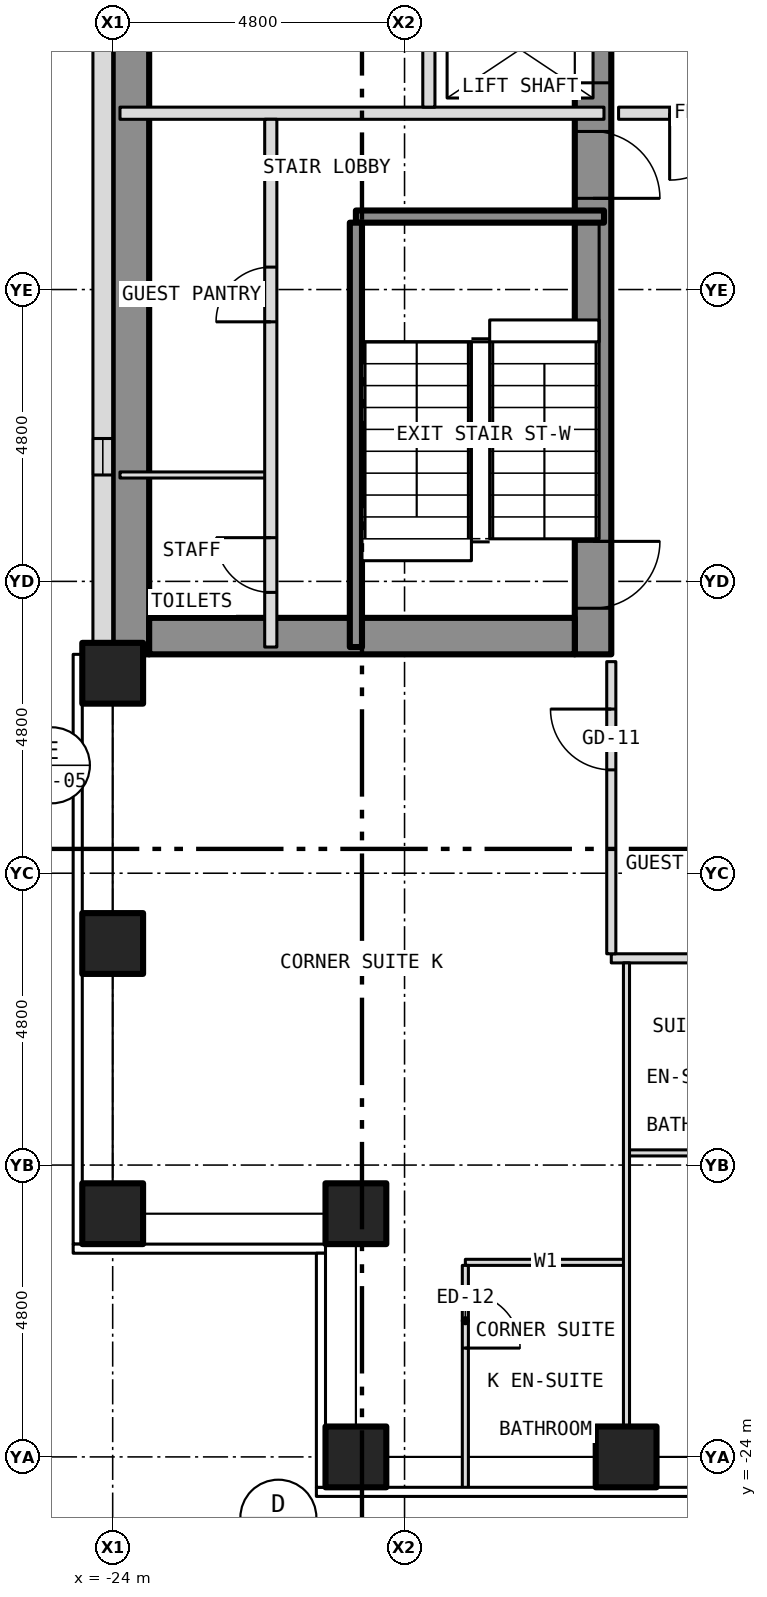
"""IFC4 building model, lengths in metres.
Left out: names, types, materials, properties, quantities, classifications, styles, units other than length and angle.
Written with IfcOpenShell. Run it as: python <this file> out.ifc"""

import sys

from ifc_helpers import new_model, si_unit, direction, frame, frame_2d, origin, origin_2d, place, context, subcontext, project, spatial, rectangle, hollow_rectangle, extrude, element, fill, save


model = new_model("IFC4")
c1 = context("Model", 3, precision=1e-05, world=origin(), true_north=direction((0.0, 1.0)))
c2 = subcontext(c1, "Body", "Model", "MODEL_VIEW")
j1 = project(units=[si_unit("LENGTHUNIT", "METRE"), si_unit("PLANEANGLEUNIT", "RADIAN")], contexts=[c1])
p1 = place(None, origin())
s1 = spatial("IfcSite", under=j1, at=p1, CompositionType="ELEMENT")
p2 = place(p1, origin())
s2 = spatial("IfcBuilding", under=s1, at=p2, CompositionType="ELEMENT")
p3 = place(p2, frame((0.0, 0.0, 46.0)))
s3 = spatial("IfcBuildingStorey", under=s2, at=p3, CompositionType="ELEMENT", Elevation=46.0)
for number, where, z_axis, x_axis in (
    (1, (-20.0, -24.0, -0.15), (0.0, 0.0, 1.0), (1.0, 0.0, 0.0)),
    (2, (-15.556, -24.0, -0.15), (0.0, 0.0, 1.0), (1.0, 0.0, 0.0)),
    (3, (-24.0, -20.0, -0.15), (0.0, 0.0, 1.0), (1.0, 0.0, 0.0)),
    (4, (-24.0, -15.556, -0.15), (0.0, 0.0, 1.0), (1.0, 0.0, 0.0)),
    (5, (-24.0, -11.111, -0.15), (0.0, 0.0, 1.0), (1.0, 0.0, 0.0)),
    (6, (-20.0, -20.0, -0.15), (0.0, 0.0, 1.0), (1.0, 0.0, 0.0)),
):
    element("IfcColumn", number, at=place(p3, frame(where, z_axis=z_axis, x_axis=x_axis)), inside=s3, PredefinedType="COLUMN", context=c2, shape_type="SweptSolid", body=[
        extrude(hollow_rectangle(XDim=1.0, YDim=1.0, WallThickness=0.06, at=origin_2d()), origin(), (0.0, 0.0, 1.0), 3.5),
    ])
p4 = place(p3, frame((-16.1, -10.8, 0.0), z_axis=(0.0, 0.0, 1.0), x_axis=(0.0, 1.0, 0.0)))
e7 = element("IfcWall", 7, at=p4, inside=s3, PredefinedType="SHEAR", context=c2, shape_type="SweptSolid", body=[
    extrude(rectangle(XDim=21.6, YDim=0.6, at=frame_2d((10.8, 0.0))), origin(), (0.0, 0.0, 1.0), 3.25),
])
p5 = place(p4, frame((9.4, 0.0, 0.0)))
e8 = element("IfcOpeningElement", 8, at=p5, cuts=e7, PredefinedType="OPENING", context=c2, shape_type="SweptSolid", body=[
    extrude(rectangle(XDim=1.1, YDim=2.1, at=frame_2d((0.55, 1.05))), frame((0.0, 0.312, 0.0), z_axis=(0.0, -1.0, 0.0), x_axis=(1.0, 0.0, 0.0)), (0.0, 0.0, 1.0), 0.624),
])
p6 = place(p4, frame((11.5, 0.0, 0.0)))
e9 = element("IfcOpeningElement", 9, at=p6, cuts=e7, PredefinedType="OPENING", context=c2, shape_type="SweptSolid", body=[
    extrude(rectangle(XDim=1.1, YDim=2.1, at=frame_2d((0.55, 1.05))), frame((0.0, 0.312, 0.0), z_axis=(0.0, -1.0, 0.0), x_axis=(1.0, 0.0, 0.0)), (0.0, 0.0, 1.0), 0.624),
])
p7 = place(p4, frame((13.6, 0.0, 0.0)))
e10 = element("IfcOpeningElement", 10, at=p7, cuts=e7, PredefinedType="OPENING", context=c2, shape_type="SweptSolid", body=[
    extrude(rectangle(XDim=1.1, YDim=2.1, at=frame_2d((0.55, 1.05))), frame((0.0, 0.312, 0.0), z_axis=(0.0, -1.0, 0.0), x_axis=(1.0, 0.0, 0.0)), (0.0, 0.0, 1.0), 0.624),
])
p8 = place(p4, frame((15.7, 0.0, 0.0)))
e11 = element("IfcOpeningElement", 11, at=p8, cuts=e7, PredefinedType="OPENING", context=c2, shape_type="SweptSolid", body=[
    extrude(rectangle(XDim=1.1, YDim=2.1, at=frame_2d((0.55, 1.05))), frame((0.0, 0.312, 0.0), z_axis=(0.0, -1.0, 0.0), x_axis=(1.0, 0.0, 0.0)), (0.0, 0.0, 1.0), 0.624),
])
p9 = place(p4, frame((17.8, 0.0, 0.0)))
e12 = element("IfcOpeningElement", 12, at=p9, cuts=e7, PredefinedType="OPENING", context=c2, shape_type="SweptSolid", body=[
    extrude(rectangle(XDim=1.1, YDim=2.1, at=frame_2d((0.55, 1.05))), frame((0.0, 0.312, 0.0), z_axis=(0.0, -1.0, 0.0), x_axis=(1.0, 0.0, 0.0)), (0.0, 0.0, 1.0), 0.624),
])
p10 = place(p4, frame((0.758, 0.0, 0.0)))
e13 = element("IfcOpeningElement", 13, at=p10, cuts=e7, PredefinedType="OPENING", context=c2, shape_type="SweptSolid", body=[
    extrude(rectangle(XDim=1.1, YDim=2.1, at=frame_2d((0.55, 1.05))), frame((0.0, 0.312, 0.0), z_axis=(0.0, -1.0, 0.0), x_axis=(1.0, 0.0, 0.0)), (0.0, 0.0, 1.0), 0.624),
])
p11 = place(p4, frame((7.5, 0.0, 0.0)))
e14 = element("IfcOpeningElement", 14, at=p11, cuts=e7, PredefinedType="OPENING", context=c2, shape_type="SweptSolid", body=[
    extrude(rectangle(XDim=1.1, YDim=2.1, at=frame_2d((0.55, 1.05))), frame((0.0, 0.312, 0.0), z_axis=(0.0, -1.0, 0.0), x_axis=(1.0, 0.0, 0.0)), (0.0, 0.0, 1.0), 0.624),
])
p12 = place(p3, frame((-23.7, -10.8, 0.0), z_axis=(0.0, 0.0, 1.0), x_axis=(0.0, 1.0, 0.0)))
e15 = element("IfcWall", 15, at=p12, inside=s3, PredefinedType="SHEAR", context=c2, shape_type="SweptSolid", body=[
    extrude(rectangle(XDim=21.6, YDim=0.6, at=frame_2d((10.8, 0.0))), origin(), (0.0, 0.0, 1.0), 3.25),
])
p13 = place(p3, frame((-23.4, -10.5, 0.0), z_axis=(0.0, 0.0, 1.0), x_axis=(1.0, 0.0, 0.0)))
e16 = element("IfcWall", 16, at=p13, inside=s3, PredefinedType="SHEAR", context=c2, shape_type="SweptSolid", body=[
    extrude(rectangle(XDim=7.0, YDim=0.6, at=frame_2d((3.5, 0.0))), origin(), (0.0, 0.0, 1.0), 3.25),
])
p14 = place(p3, frame((-24.163, 10.8, 0.0), z_axis=(0.0, 0.0, 1.0), x_axis=(0.0, -1.0, 0.0)))
e17 = element("IfcWall", 17, at=p14, inside=s3, PredefinedType="SOLIDWALL", context=c2, shape_type="SweptSolid", body=[
    extrude(rectangle(XDim=21.6, YDim=0.325, at=frame_2d((10.8, 0.0))), origin(), (0.0, 0.0, 1.0), 3.5),
])
p15 = place(p14, frame((18.05, 0.0, 1.0)))
e18 = element("IfcOpeningElement", 18, at=p15, cuts=e17, PredefinedType="OPENING", context=c2, shape_type="SweptSolid", body=[
    extrude(rectangle(XDim=0.6, YDim=1.5, at=frame_2d((0.3, 0.75))), frame((0.0, 0.175, 0.0), z_axis=(0.0, -1.0, 0.0), x_axis=(1.0, 0.0, 0.0)), (0.0, 0.0, 1.0), 0.349),
])
p16 = place(p3, frame((-18.2, -20.8, 0.0), z_axis=(0.0, 0.0, 1.0), x_axis=(1.0, 0.0, 0.0)))
e19 = element("IfcWall", 19, at=p16, inside=s3, PredefinedType="PARTITIONING", context=c2, shape_type="SweptSolid", body=[
    extrude(rectangle(XDim=2.65, YDim=0.1, at=frame_2d((1.325, 0.0))), origin(), (0.0, 0.0, 1.0), 3.35),
])
p17 = place(p3, frame((-15.55, -19.0, 0.0), z_axis=(0.0, 0.0, 1.0), x_axis=(1.0, 0.0, 0.0)))
e20 = element("IfcWall", 20, at=p17, inside=s3, PredefinedType="PARTITIONING", context=c2, shape_type="SweptSolid", body=[
    extrude(rectangle(XDim=2.2, YDim=0.1, at=frame_2d((1.1, 0.0))), origin(), (0.0, 0.0, 1.0), 3.35),
])
p18 = place(p3, frame((-15.8, -15.8, 0.0), z_axis=(0.0, 0.0, 1.0), x_axis=(1.0, 0.0, 0.0)))
e21 = element("IfcWall", 21, at=p18, inside=s3, PredefinedType="PARTITIONING", context=c2, shape_type="SweptSolid", body=[
    extrude(rectangle(XDim=31.6, YDim=0.15, at=frame_2d((15.8, 0.0))), origin(), (0.0, 0.0, 1.0), 3.35),
])
p19 = place(p18, frame((6.633, 0.0, 0.0)))
e22 = element("IfcOpeningElement", 22, at=p19, cuts=e21, PredefinedType="OPENING", context=c2, shape_type="SweptSolid", body=[
    extrude(rectangle(XDim=1.0, YDim=2.1, at=frame_2d((0.5, 1.05))), frame((0.0, 0.087, 0.0), z_axis=(0.0, -1.0, 0.0), x_axis=(1.0, 0.0, 0.0)), (0.0, 0.0, 1.0), 0.174),
])
p20 = place(p18, frame((11.956, 0.0, 0.0)))
e23 = element("IfcOpeningElement", 23, at=p20, cuts=e21, PredefinedType="OPENING", context=c2, shape_type="SweptSolid", body=[
    extrude(rectangle(XDim=1.0, YDim=2.1, at=frame_2d((0.5, 1.05))), frame((0.0, 0.087, 0.0), z_axis=(0.0, -1.0, 0.0), x_axis=(1.0, 0.0, 0.0)), (0.0, 0.0, 1.0), 0.174),
])
p21 = place(p18, frame((16.4, 0.0, 0.0)))
e24 = element("IfcOpeningElement", 24, at=p21, cuts=e21, PredefinedType="OPENING", context=c2, shape_type="SweptSolid", body=[
    extrude(rectangle(XDim=1.0, YDim=2.1, at=frame_2d((0.5, 1.05))), frame((0.0, 0.087, 0.0), z_axis=(0.0, -1.0, 0.0), x_axis=(1.0, 0.0, 0.0)), (0.0, 0.0, 1.0), 0.174),
])
p22 = place(p18, frame((21.956, 0.0, 0.0)))
e25 = element("IfcOpeningElement", 25, at=p22, cuts=e21, PredefinedType="OPENING", context=c2, shape_type="SweptSolid", body=[
    extrude(rectangle(XDim=1.0, YDim=2.1, at=frame_2d((0.5, 1.05))), frame((0.0, 0.087, 0.0), z_axis=(0.0, -1.0, 0.0), x_axis=(1.0, 0.0, 0.0)), (0.0, 0.0, 1.0), 0.174),
])
p23 = place(p18, frame((28.623, 0.0, 0.0)))
e26 = element("IfcOpeningElement", 26, at=p23, cuts=e21, PredefinedType="OPENING", context=c2, shape_type="SweptSolid", body=[
    extrude(rectangle(XDim=1.0, YDim=2.1, at=frame_2d((0.5, 1.05))), frame((0.0, 0.087, 0.0), z_axis=(0.0, -1.0, 0.0), x_axis=(1.0, 0.0, 0.0)), (0.0, 0.0, 1.0), 0.174),
])
p24 = place(p3, frame((-23.88, -7.85, 0.0), z_axis=(0.0, 0.0, 1.0), x_axis=(1.0, 0.0, 0.0)))
e27 = element("IfcWall", 27, at=p24, inside=s3, PredefinedType="PARTITIONING", context=c2, shape_type="SweptSolid", body=[
    extrude(rectangle(XDim=2.48, YDim=0.1, at=frame_2d((1.24, 0.0))), origin(), (0.0, 0.0, 1.0), 3.25),
])
p25 = place(p3, frame((-20.0, -3.6, 0.0), z_axis=(0.0, 0.0, 1.0), x_axis=(1.0, 0.0, 0.0)))
e28 = element("IfcWall", 28, at=p25, inside=s3, PredefinedType="SHEAR", context=c2, shape_type="SweptSolid", body=[
    extrude(rectangle(XDim=4.08, YDim=0.2, at=frame_2d((2.04, 0.0))), origin(), (0.0, 0.0, 1.0), 3.25),
])
p26 = place(p3, frame((-23.88, -1.9, 0.0), z_axis=(0.0, 0.0, 1.0), x_axis=(1.0, 0.0, 0.0)))
e29 = element("IfcWall", 29, at=p26, inside=s3, PredefinedType="PARTITIONING", context=c2, shape_type="SweptSolid", body=[
    extrude(rectangle(XDim=7.96, YDim=0.2, at=frame_2d((3.98, 0.0))), origin(), (0.0, 0.0, 1.0), 3.25),
])
p27 = place(p3, frame((-15.68, -1.9, 0.0), z_axis=(0.0, 0.0, 1.0), x_axis=(1.0, 0.0, 0.0)))
e30 = element("IfcWall", 30, at=p27, inside=s3, PredefinedType="PARTITIONING", context=c2, shape_type="SweptSolid", body=[
    extrude(rectangle(XDim=3.28, YDim=0.2, at=frame_2d((1.64, 0.0))), origin(), (0.0, 0.0, 1.0), 3.35),
])
p28 = place(p27, frame((0.84, 0.0, 0.0)))
e31 = element("IfcOpeningElement", 31, at=p28, cuts=e30, PredefinedType="OPENING", context=c2, shape_type="SweptSolid", body=[
    extrude(rectangle(XDim=1.1, YDim=2.1, at=frame_2d((0.55, 1.05))), frame((0.0, 0.112, 0.0), z_axis=(0.0, -1.0, 0.0), x_axis=(1.0, 0.0, 0.0)), (0.0, 0.0, 1.0), 0.224),
])
p29 = place(p3, frame((-21.4, -10.68, 0.0), z_axis=(0.0, 0.0, 1.0), x_axis=(0.0, 1.0, 0.0)))
e32 = element("IfcWall", 32, at=p29, inside=s3, PredefinedType="PARTITIONING", context=c2, shape_type="SweptSolid", body=[
    extrude(rectangle(XDim=8.68, YDim=0.2, at=frame_2d((4.34, 0.0))), origin(), (0.0, 0.0, 1.0), 3.25),
])
p30 = place(p29, frame((0.899, 0.0, 0.0)))
e33 = element("IfcOpeningElement", 33, at=p30, cuts=e32, PredefinedType="OPENING", context=c2, shape_type="SweptSolid", body=[
    extrude(rectangle(XDim=0.9, YDim=2.1, at=frame_2d((0.45, 1.05))), frame((0.0, 0.112, 0.0), z_axis=(0.0, -1.0, 0.0), x_axis=(1.0, 0.0, 0.0)), (0.0, 0.0, 1.0), 0.224),
])
p31 = place(p29, frame((5.349, 0.0, 0.0)))
e34 = element("IfcOpeningElement", 34, at=p31, cuts=e32, PredefinedType="OPENING", context=c2, shape_type="SweptSolid", body=[
    extrude(rectangle(XDim=0.9, YDim=2.1, at=frame_2d((0.45, 1.05))), frame((0.0, 0.112, 0.0), z_axis=(0.0, -1.0, 0.0), x_axis=(1.0, 0.0, 0.0)), (0.0, 0.0, 1.0), 0.224),
])
p32 = place(p3, frame((-20.0, -10.68, 0.0), z_axis=(0.0, 0.0, 1.0), x_axis=(0.0, 1.0, 0.0)))
e35 = element("IfcWall", 35, at=p32, inside=s3, PredefinedType="SHEAR", context=c2, shape_type="SweptSolid", body=[
    extrude(rectangle(XDim=6.98, YDim=0.2, at=frame_2d((3.49, 0.0))), origin(), (0.0, 0.0, 1.0), 3.25),
])
p33 = place(p3, frame((-18.8, -1.8, 0.0), z_axis=(0.0, 0.0, 1.0), x_axis=(0.0, 1.0, 0.0)))
e36 = element("IfcWall", 36, at=p33, inside=s3, PredefinedType="PARTITIONING", context=c2, shape_type="SweptSolid", body=[
    extrude(rectangle(XDim=12.48, YDim=0.2, at=frame_2d((6.24, 0.0))), origin(), (0.0, 0.0, 1.0), 3.25),
])
p34 = place(p3, frame((-18.2, -24.53, 0.0), z_axis=(0.0, 0.0, 1.0), x_axis=(0.0, 1.0, 0.0)))
e37 = element("IfcWall", 37, at=p34, inside=s3, PredefinedType="PARTITIONING", context=c2, shape_type="SweptSolid", body=[
    extrude(rectangle(XDim=3.68, YDim=0.1, at=frame_2d((1.84, 0.0))), origin(), (0.0, 0.0, 1.0), 3.35),
])
p35 = place(p34, frame((2.32, 0.0, 0.0)))
e38 = element("IfcOpeningElement", 38, at=p35, cuts=e37, PredefinedType="OPENING", context=c2, shape_type="SweptSolid", body=[
    extrude(rectangle(XDim=0.9, YDim=2.1, at=frame_2d((0.45, 1.05))), frame((0.0, 0.062, 0.0), z_axis=(0.0, -1.0, 0.0), x_axis=(1.0, 0.0, 0.0)), (0.0, 0.0, 1.0), 0.124),
])
p36 = place(p3, frame((-15.8, -15.725, 0.0), z_axis=(0.0, 0.0, 1.0), x_axis=(0.0, 1.0, 0.0)))
e39 = element("IfcWall", 39, at=p36, inside=s3, PredefinedType="PARTITIONING", context=c2, shape_type="SweptSolid", body=[
    extrude(rectangle(XDim=4.805, YDim=0.15, at=frame_2d((2.403, 0.0))), origin(), (0.0, 0.0, 1.0), 3.35),
])
p37 = place(p36, frame((3.025, 0.0, 0.0)))
e40 = element("IfcOpeningElement", 40, at=p37, cuts=e39, PredefinedType="OPENING", context=c2, shape_type="SweptSolid", body=[
    extrude(rectangle(XDim=1.0, YDim=2.1, at=frame_2d((0.5, 1.05))), frame((0.0, 0.087, 0.0), z_axis=(0.0, -1.0, 0.0), x_axis=(1.0, 0.0, 0.0)), (0.0, 0.0, 1.0), 0.174),
])
p38 = place(p3, frame((-15.55, -23.88, 0.0), z_axis=(0.0, 0.0, 1.0), x_axis=(0.0, 1.0, 0.0)))
e41 = element("IfcWall", 41, at=p38, inside=s3, PredefinedType="PARTITIONING", context=c2, shape_type="SweptSolid", body=[
    extrude(rectangle(XDim=8.005, YDim=0.1, at=frame_2d((4.002, 0.0))), origin(), (0.0, 0.0, 1.0), 3.35),
])
p39 = place(p15, origin())
e42 = element("IfcWindow", 42, at=p39, inside=s3, PartitioningType="SINGLE_PANEL", PredefinedType="WINDOW", context=c2, shape_type="SweptSolid", body=[
    extrude(rectangle(XDim=0.6, YDim=1.5, at=frame_2d((0.3, 0.75))), frame((0.0, -0.073, 0.0), z_axis=(0.0, -1.0, 0.0), x_axis=(1.0, 0.0, 0.0)), (0.0, 0.0, 1.0), 0.06),
])
fill(e18, e42)
p40 = place(p5, origin())
e43 = element("IfcDoor", 43, at=p40, inside=s3, OperationType="SLIDING_TO_LEFT", PredefinedType="DOOR", context=c2, shape_type="SweptSolid", body=[
    extrude(rectangle(XDim=1.1, YDim=2.1, at=frame_2d((0.55, 1.05))), frame((0.0, 0.025, 0.0), z_axis=(0.0, -1.0, 0.0), x_axis=(1.0, 0.0, 0.0)), (0.0, 0.0, 1.0), 0.05),
])
fill(e8, e43)
p41 = place(p10, origin())
e44 = element("IfcDoor", 44, at=p41, inside=s3, OperationType="SINGLE_SWING_RIGHT", PredefinedType="DOOR", context=c2, shape_type="SweptSolid", body=[
    extrude(rectangle(XDim=1.1, YDim=2.1, at=frame_2d((0.55, 1.05))), frame((0.0, 0.025, 0.0), z_axis=(0.0, -1.0, 0.0), x_axis=(1.0, 0.0, 0.0)), (0.0, 0.0, 1.0), 0.05),
])
fill(e13, e44)
p42 = place(p11, origin())
e45 = element("IfcDoor", 45, at=p42, inside=s3, OperationType="SINGLE_SWING_LEFT", PredefinedType="DOOR", context=c2, shape_type="SweptSolid", body=[
    extrude(rectangle(XDim=1.1, YDim=2.1, at=frame_2d((0.55, 1.05))), frame((0.0, 0.025, 0.0), z_axis=(0.0, -1.0, 0.0), x_axis=(1.0, 0.0, 0.0)), (0.0, 0.0, 1.0), 0.05),
])
fill(e14, e45)
p43 = place(p30, origin())
e46 = element("IfcDoor", 46, at=p43, inside=s3, OperationType="SINGLE_SWING_RIGHT", PredefinedType="DOOR", context=c2, shape_type="SweptSolid", body=[
    extrude(rectangle(XDim=0.9, YDim=2.1, at=frame_2d((0.45, 1.05))), frame((0.0, 0.025, 0.0), z_axis=(0.0, -1.0, 0.0), x_axis=(1.0, 0.0, 0.0)), (0.0, 0.0, 1.0), 0.05),
])
fill(e33, e46)
p44 = place(p31, origin())
e47 = element("IfcDoor", 47, at=p44, inside=s3, OperationType="SINGLE_SWING_LEFT", PredefinedType="DOOR", context=c2, shape_type="SweptSolid", body=[
    extrude(rectangle(XDim=0.9, YDim=2.1, at=frame_2d((0.45, 1.05))), frame((0.0, 0.025, 0.0), z_axis=(0.0, -1.0, 0.0), x_axis=(1.0, 0.0, 0.0)), (0.0, 0.0, 1.0), 0.05),
])
fill(e34, e47)
p45 = place(p28, origin())
e48 = element("IfcDoor", 48, at=p45, inside=s3, OperationType="SINGLE_SWING_LEFT", PredefinedType="DOOR", context=c2, shape_type="SweptSolid", body=[
    extrude(rectangle(XDim=1.1, YDim=2.1, at=frame_2d((0.55, 1.05))), frame((0.0, 0.025, 0.0), z_axis=(0.0, -1.0, 0.0), x_axis=(1.0, 0.0, 0.0)), (0.0, 0.0, 1.0), 0.05),
])
fill(e31, e48)
p46 = place(p35, origin())
e49 = element("IfcDoor", 49, at=p46, inside=s3, OperationType="SINGLE_SWING_LEFT", PredefinedType="DOOR", context=c2, shape_type="SweptSolid", body=[
    extrude(rectangle(XDim=0.9, YDim=2.1, at=frame_2d((0.45, 1.05))), frame((0.0, 0.025, 0.0), z_axis=(0.0, -1.0, 0.0), x_axis=(1.0, 0.0, 0.0)), (0.0, 0.0, 1.0), 0.05),
])
fill(e38, e49)
p47 = place(p37, origin())
e50 = element("IfcDoor", 50, at=p47, inside=s3, OperationType="SINGLE_SWING_RIGHT", PredefinedType="DOOR", context=c2, shape_type="SweptSolid", body=[
    extrude(rectangle(XDim=1.0, YDim=2.1, at=frame_2d((0.5, 1.05))), frame((0.0, 0.025, 0.0), z_axis=(0.0, -1.0, 0.0), x_axis=(1.0, 0.0, 0.0)), (0.0, 0.0, 1.0), 0.05),
])
fill(e40, e50)
save(model, sys.argv[1])
